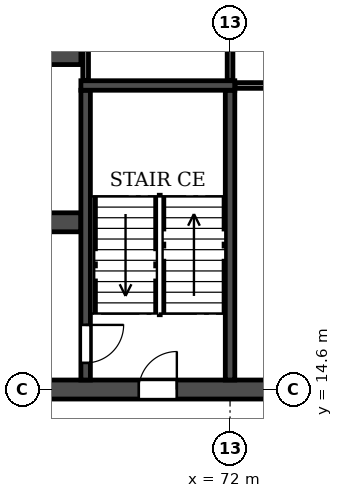
"""IFC4 building model, lengths in metres.
Left out: names, types, materials, properties, quantities, classifications, styles, units other than length and angle.
Written with IfcOpenShell. Run it as: python <this file> out.ifc"""

import sys

from ifc_helpers import new_model, si_unit, direction, frame, frame_2d, origin, place, context, subcontext, project, spatial, rectangle, extrude, element, fill, save


model = new_model("IFC4")
c1 = context("Model", 3, precision=1e-05, world=origin(), true_north=direction((0.0, 1.0)))
c2 = subcontext(c1, "Body", "Model", "MODEL_VIEW")
j1 = project(units=[si_unit("LENGTHUNIT", "METRE"), si_unit("PLANEANGLEUNIT", "RADIAN")], contexts=[c1])
p1 = place(None, origin())
s1 = spatial("IfcSite", under=j1, at=p1, CompositionType="ELEMENT")
p2 = place(p1, origin())
s2 = spatial("IfcBuilding", under=s1, at=p2, CompositionType="ELEMENT")
p3 = place(p2, frame((0.0, 0.0, 105.9)))
s3 = spatial("IfcBuildingStorey", under=s2, at=p3, CompositionType="ELEMENT", Elevation=105.9)
p4 = place(p3, frame((14.6, 14.6, 0.0), z_axis=(0.0, 0.0, 1.0), x_axis=(1.0, 0.0, 0.0)))
e1 = element("IfcWall", 1, at=p4, inside=s3, PredefinedType="SOLIDWALL", context=c2, shape_type="SweptSolid", body=[
    extrude(rectangle(XDim=72.8, YDim=0.5, at=frame_2d((36.4, 0.0))), origin(), (0.0, 0.0, 1.0), 3.06),
])
p5 = place(p4, frame((4.3, 0.0, 0.0)))
e2 = element("IfcOpeningElement", 2, at=p5, cuts=e1, PredefinedType="OPENING", context=c2, shape_type="SweptSolid", body=[
    extrude(rectangle(XDim=1.0, YDim=2.1, at=frame_2d((0.5, 1.05))), frame((0.0, 0.26, 0.0), z_axis=(0.0, -1.0, 0.0), x_axis=(1.0, 0.0, 0.0)), (0.0, 0.0, 1.0), 0.52),
])
p6 = place(p4, frame((12.25, 0.0, 0.0)))
e3 = element("IfcOpeningElement", 3, at=p6, cuts=e1, PredefinedType="OPENING", context=c2, shape_type="SweptSolid", body=[
    extrude(rectangle(XDim=0.9, YDim=2.1, at=frame_2d((0.45, 1.05))), frame((0.0, 0.26, 0.0), z_axis=(0.0, -1.0, 0.0), x_axis=(1.0, 0.0, 0.0)), (0.0, 0.0, 1.0), 0.52),
])
p7 = place(p4, frame((16.8, 0.0, 0.0)))
e4 = element("IfcOpeningElement", 4, at=p7, cuts=e1, PredefinedType="OPENING", context=c2, shape_type="SweptSolid", body=[
    extrude(rectangle(XDim=1.0, YDim=2.1, at=frame_2d((0.5, 1.05))), frame((0.0, 0.26, 0.0), z_axis=(0.0, -1.0, 0.0), x_axis=(1.0, 0.0, 0.0)), (0.0, 0.0, 1.0), 0.52),
])
p8 = place(p4, frame((30.7, 0.0, 0.0)))
e5 = element("IfcOpeningElement", 5, at=p8, cuts=e1, PredefinedType="OPENING", context=c2, shape_type="SweptSolid", body=[
    extrude(rectangle(XDim=1.0, YDim=2.1, at=frame_2d((0.5, 1.05))), frame((0.0, 0.26, 0.0), z_axis=(0.0, -1.0, 0.0), x_axis=(1.0, 0.0, 0.0)), (0.0, 0.0, 1.0), 0.52),
])
p9 = place(p4, frame((35.9, 0.0, 0.0)))
e6 = element("IfcOpeningElement", 6, at=p9, cuts=e1, PredefinedType="OPENING", context=c2, shape_type="SweptSolid", body=[
    extrude(rectangle(XDim=1.0, YDim=2.1, at=frame_2d((0.5, 1.05))), frame((0.0, 0.26, 0.0), z_axis=(0.0, -1.0, 0.0), x_axis=(1.0, 0.0, 0.0)), (0.0, 0.0, 1.0), 0.52),
])
p10 = place(p4, frame((39.8, 0.0, 0.0)))
e7 = element("IfcOpeningElement", 7, at=p10, cuts=e1, PredefinedType="OPENING", context=c2, shape_type="SweptSolid", body=[
    extrude(rectangle(XDim=1.0, YDim=2.1, at=frame_2d((0.5, 1.05))), frame((0.0, 0.26, 0.0), z_axis=(0.0, -1.0, 0.0), x_axis=(1.0, 0.0, 0.0)), (0.0, 0.0, 1.0), 0.52),
])
p11 = place(p4, frame((43.7, 0.0, 0.0)))
e8 = element("IfcOpeningElement", 8, at=p11, cuts=e1, PredefinedType="OPENING", context=c2, shape_type="SweptSolid", body=[
    extrude(rectangle(XDim=1.0, YDim=2.1, at=frame_2d((0.5, 1.05))), frame((0.0, 0.26, 0.0), z_axis=(0.0, -1.0, 0.0), x_axis=(1.0, 0.0, 0.0)), (0.0, 0.0, 1.0), 0.52),
])
p12 = place(p4, frame((55.0, 0.0, 0.0)))
e9 = element("IfcOpeningElement", 9, at=p12, cuts=e1, PredefinedType="OPENING", context=c2, shape_type="SweptSolid", body=[
    extrude(rectangle(XDim=1.0, YDim=2.1, at=frame_2d((0.5, 1.05))), frame((0.0, 0.26, 0.0), z_axis=(0.0, -1.0, 0.0), x_axis=(1.0, 0.0, 0.0)), (0.0, 0.0, 1.0), 0.52),
])
p13 = place(p4, frame((59.65, 0.0, 0.0)))
e10 = element("IfcOpeningElement", 10, at=p13, cuts=e1, PredefinedType="OPENING", context=c2, shape_type="SweptSolid", body=[
    extrude(rectangle(XDim=0.9, YDim=2.1, at=frame_2d((0.45, 1.05))), frame((0.0, 0.26, 0.0), z_axis=(0.0, -1.0, 0.0), x_axis=(1.0, 0.0, 0.0)), (0.0, 0.0, 1.0), 0.52),
])
p14 = place(p4, frame((67.5, 0.0, 0.0)))
e11 = element("IfcOpeningElement", 11, at=p14, cuts=e1, PredefinedType="OPENING", context=c2, shape_type="SweptSolid", body=[
    extrude(rectangle(XDim=1.0, YDim=2.1, at=frame_2d((0.5, 1.05))), frame((0.0, 0.26, 0.0), z_axis=(0.0, -1.0, 0.0), x_axis=(1.0, 0.0, 0.0)), (0.0, 0.0, 1.0), 0.52),
])
p15 = place(p3, frame((33.925, 19.0, 0.0), z_axis=(0.0, 0.0, 1.0), x_axis=(1.0, 0.0, 0.0)))
e12 = element("IfcWall", 12, at=p15, inside=s3, PredefinedType="SOLIDWALL", context=c2, shape_type="SweptSolid", body=[
    extrude(rectangle(XDim=34.15, YDim=0.5, at=frame_2d((17.075, 0.0))), origin(), (0.0, 0.0, 1.0), 3.06),
])
p16 = place(p15, frame((16.175, 0.0, 0.0)))
e13 = element("IfcOpeningElement", 13, at=p16, cuts=e12, PredefinedType="OPENING", context=c2, shape_type="SweptSolid", body=[
    extrude(rectangle(XDim=1.8, YDim=2.1, at=frame_2d((0.9, 1.05))), frame((0.0, 0.26, 0.0), z_axis=(0.0, -1.0, 0.0), x_axis=(1.0, 0.0, 0.0)), (0.0, 0.0, 1.0), 0.52),
])
p17 = place(p15, frame((1.525, 0.0, 0.0)))
e14 = element("IfcOpeningElement", 14, at=p17, cuts=e12, PredefinedType="OPENING", context=c2, shape_type="SweptSolid", body=[
    extrude(rectangle(XDim=1.8, YDim=2.1, at=frame_2d((0.9, 1.05))), frame((0.0, 0.26, 0.0), z_axis=(0.0, -1.0, 0.0), x_axis=(1.0, 0.0, 0.0)), (0.0, 0.0, 1.0), 0.52),
])
p18 = place(p15, frame((8.725, 0.0, 0.0)))
e15 = element("IfcOpeningElement", 15, at=p18, cuts=e12, PredefinedType="OPENING", context=c2, shape_type="SweptSolid", body=[
    extrude(rectangle(XDim=1.1, YDim=2.1, at=frame_2d((0.55, 1.05))), frame((0.0, 0.26, 0.0), z_axis=(0.0, -1.0, 0.0), x_axis=(1.0, 0.0, 0.0)), (0.0, 0.0, 1.0), 0.52),
])
p19 = place(p15, frame((11.325, 0.0, 0.0)))
e16 = element("IfcOpeningElement", 16, at=p19, cuts=e12, PredefinedType="OPENING", context=c2, shape_type="SweptSolid", body=[
    extrude(rectangle(XDim=1.1, YDim=2.1, at=frame_2d((0.55, 1.05))), frame((0.0, 0.26, 0.0), z_axis=(0.0, -1.0, 0.0), x_axis=(1.0, 0.0, 0.0)), (0.0, 0.0, 1.0), 0.52),
])
p20 = place(p15, frame((13.925, 0.0, 0.0)))
e17 = element("IfcOpeningElement", 17, at=p20, cuts=e12, PredefinedType="OPENING", context=c2, shape_type="SweptSolid", body=[
    extrude(rectangle(XDim=1.1, YDim=2.1, at=frame_2d((0.55, 1.05))), frame((0.0, 0.26, 0.0), z_axis=(0.0, -1.0, 0.0), x_axis=(1.0, 0.0, 0.0)), (0.0, 0.0, 1.0), 0.52),
])
p21 = place(p15, frame((19.125, 0.0, 0.0)))
e18 = element("IfcOpeningElement", 18, at=p21, cuts=e12, PredefinedType="OPENING", context=c2, shape_type="SweptSolid", body=[
    extrude(rectangle(XDim=1.1, YDim=2.1, at=frame_2d((0.55, 1.05))), frame((0.0, 0.26, 0.0), z_axis=(0.0, -1.0, 0.0), x_axis=(1.0, 0.0, 0.0)), (0.0, 0.0, 1.0), 0.52),
])
p22 = place(p15, frame((21.725, 0.0, 0.0)))
e19 = element("IfcOpeningElement", 19, at=p22, cuts=e12, PredefinedType="OPENING", context=c2, shape_type="SweptSolid", body=[
    extrude(rectangle(XDim=1.1, YDim=2.1, at=frame_2d((0.55, 1.05))), frame((0.0, 0.26, 0.0), z_axis=(0.0, -1.0, 0.0), x_axis=(1.0, 0.0, 0.0)), (0.0, 0.0, 1.0), 0.52),
])
p23 = place(p15, frame((24.325, 0.0, 0.0)))
e20 = element("IfcOpeningElement", 20, at=p23, cuts=e12, PredefinedType="OPENING", context=c2, shape_type="SweptSolid", body=[
    extrude(rectangle(XDim=1.1, YDim=2.1, at=frame_2d((0.55, 1.05))), frame((0.0, 0.26, 0.0), z_axis=(0.0, -1.0, 0.0), x_axis=(1.0, 0.0, 0.0)), (0.0, 0.0, 1.0), 0.52),
])
p24 = place(p15, frame((30.825, 0.0, 0.0)))
e21 = element("IfcOpeningElement", 21, at=p24, cuts=e12, PredefinedType="OPENING", context=c2, shape_type="SweptSolid", body=[
    extrude(rectangle(XDim=1.8, YDim=2.1, at=frame_2d((0.9, 1.05))), frame((0.0, 0.26, 0.0), z_axis=(0.0, -1.0, 0.0), x_axis=(1.0, 0.0, 0.0)), (0.0, 0.0, 1.0), 0.52),
])
p25 = place(p3, frame((33.925, 23.4, 0.0), z_axis=(0.0, 0.0, 1.0), x_axis=(1.0, 0.0, 0.0)))
e22 = element("IfcWall", 22, at=p25, inside=s3, PredefinedType="SOLIDWALL", context=c2, shape_type="SweptSolid", body=[
    extrude(rectangle(XDim=34.15, YDim=0.5, at=frame_2d((17.075, 0.0))), origin(), (0.0, 0.0, 1.0), 3.06),
])
p26 = place(p25, frame((16.175, 0.0, 0.0)))
e23 = element("IfcOpeningElement", 23, at=p26, cuts=e22, PredefinedType="OPENING", context=c2, shape_type="SweptSolid", body=[
    extrude(rectangle(XDim=1.8, YDim=2.1, at=frame_2d((0.9, 1.05))), frame((0.0, 0.26, 0.0), z_axis=(0.0, -1.0, 0.0), x_axis=(1.0, 0.0, 0.0)), (0.0, 0.0, 1.0), 0.52),
])
p27 = place(p25, frame((11.025, 0.0, 0.0)))
e24 = element("IfcOpeningElement", 24, at=p27, cuts=e22, PredefinedType="OPENING", context=c2, shape_type="SweptSolid", body=[
    extrude(rectangle(XDim=1.1, YDim=2.1, at=frame_2d((0.55, 1.05))), frame((0.0, 0.26, 0.0), z_axis=(0.0, -1.0, 0.0), x_axis=(1.0, 0.0, 0.0)), (0.0, 0.0, 1.0), 0.52),
])
p28 = place(p3, frame((68.2, 14.85, 0.0), z_axis=(0.0, 0.0, 1.0), x_axis=(0.0, 1.0, 0.0)))
e25 = element("IfcWall", 25, at=p28, inside=s3, PredefinedType="SOLIDWALL", context=c2, shape_type="SweptSolid", body=[
    extrude(rectangle(XDim=7.625, YDim=0.25, at=frame_2d((3.812, 0.0))), origin(), (0.0, 0.0, 1.0), 3.06),
])
p29 = place(p28, frame((0.45, 0.0, 0.0)))
e26 = element("IfcOpeningElement", 26, at=p29, cuts=e25, PredefinedType="OPENING", context=c2, shape_type="SweptSolid", body=[
    extrude(rectangle(XDim=1.0, YDim=2.1, at=frame_2d((0.5, 1.05))), frame((0.0, 0.135, 0.0), z_axis=(0.0, -1.0, 0.0), x_axis=(1.0, 0.0, 0.0)), (0.0, 0.0, 1.0), 0.27),
])
p30 = place(p3, frame((72.0, 14.85, 0.0), z_axis=(0.0, 0.0, 1.0), x_axis=(0.0, 1.0, 0.0)))
e27 = element("IfcWall", 27, at=p30, inside=s3, PredefinedType="SOLIDWALL", context=c2, shape_type="SweptSolid", body=[
    extrude(rectangle(XDim=7.625, YDim=0.25, at=frame_2d((3.812, 0.0))), origin(), (0.0, 0.0, 1.0), 3.06),
])
p31 = place(p3, frame((68.075, 22.6, 0.0), z_axis=(0.0, 0.0, 1.0), x_axis=(1.0, 0.0, 0.0)))
e28 = element("IfcWall", 28, at=p31, inside=s3, PredefinedType="SOLIDWALL", context=c2, shape_type="SweptSolid", body=[
    extrude(rectangle(XDim=4.05, YDim=0.25, at=frame_2d((2.025, 0.0))), origin(), (0.0, 0.0, 1.0), 3.06),
])
p32 = place(p3, frame((72.135, 22.6, 0.0), z_axis=(0.0, 0.0, 1.0), x_axis=(1.0, 0.0, 0.0)))
e29 = element("IfcWall", 29, at=p32, inside=s3, PredefinedType="PARTITIONING", context=c2, shape_type="SweptSolid", body=[
    extrude(rectangle(XDim=5.13, YDim=0.15, at=frame_2d((2.565, 0.0))), origin(), (0.0, 0.0, 1.0), 3.06),
])
for number, where, z_axis, x_axis in (
    (30, (68.2, 22.735, 0.0), (0.0, 0.0, 1.0), (0.0, 1.0, 0.0)),
    (31, (72.0, 22.735, 0.0), (0.0, 0.0, 1.0), (0.0, 1.0, 0.0)),
):
    element("IfcWall", number, at=place(p3, frame(where, z_axis=z_axis, x_axis=x_axis)), inside=s3, PredefinedType="PARTITIONING", context=c2, shape_type="SweptSolid", body=[
        extrude(rectangle(XDim=4.805, YDim=0.15, at=frame_2d((2.402, 0.0))), origin(), (0.0, 0.0, 1.0), 3.06),
    ])
p33 = place(p12, origin())
e32 = element("IfcDoor", 32, at=p33, inside=s3, OperationType="SINGLE_SWING_RIGHT", PredefinedType="DOOR", context=c2, shape_type="SweptSolid", body=[
    extrude(rectangle(XDim=1.0, YDim=2.1, at=frame_2d((0.5, 1.05))), frame((0.0, 0.025, 0.0), z_axis=(0.0, -1.0, 0.0), x_axis=(1.0, 0.0, 0.0)), (0.0, 0.0, 1.0), 0.05),
])
fill(e9, e32)
p34 = place(p29, frame((1.0, 0.0, 0.0), z_axis=(0.0, 0.0, 1.0), x_axis=(-1.0, 0.0, 0.0)))
e33 = element("IfcDoor", 33, at=p34, inside=s3, OperationType="SINGLE_SWING_LEFT", PredefinedType="DOOR", context=c2, shape_type="SweptSolid", body=[
    extrude(rectangle(XDim=1.0, YDim=2.1, at=frame_2d((0.5, 1.05))), frame((0.0, 0.025, 0.0), z_axis=(0.0, -1.0, 0.0), x_axis=(1.0, 0.0, 0.0)), (0.0, 0.0, 1.0), 0.05),
])
fill(e26, e33)
save(model, sys.argv[1])
